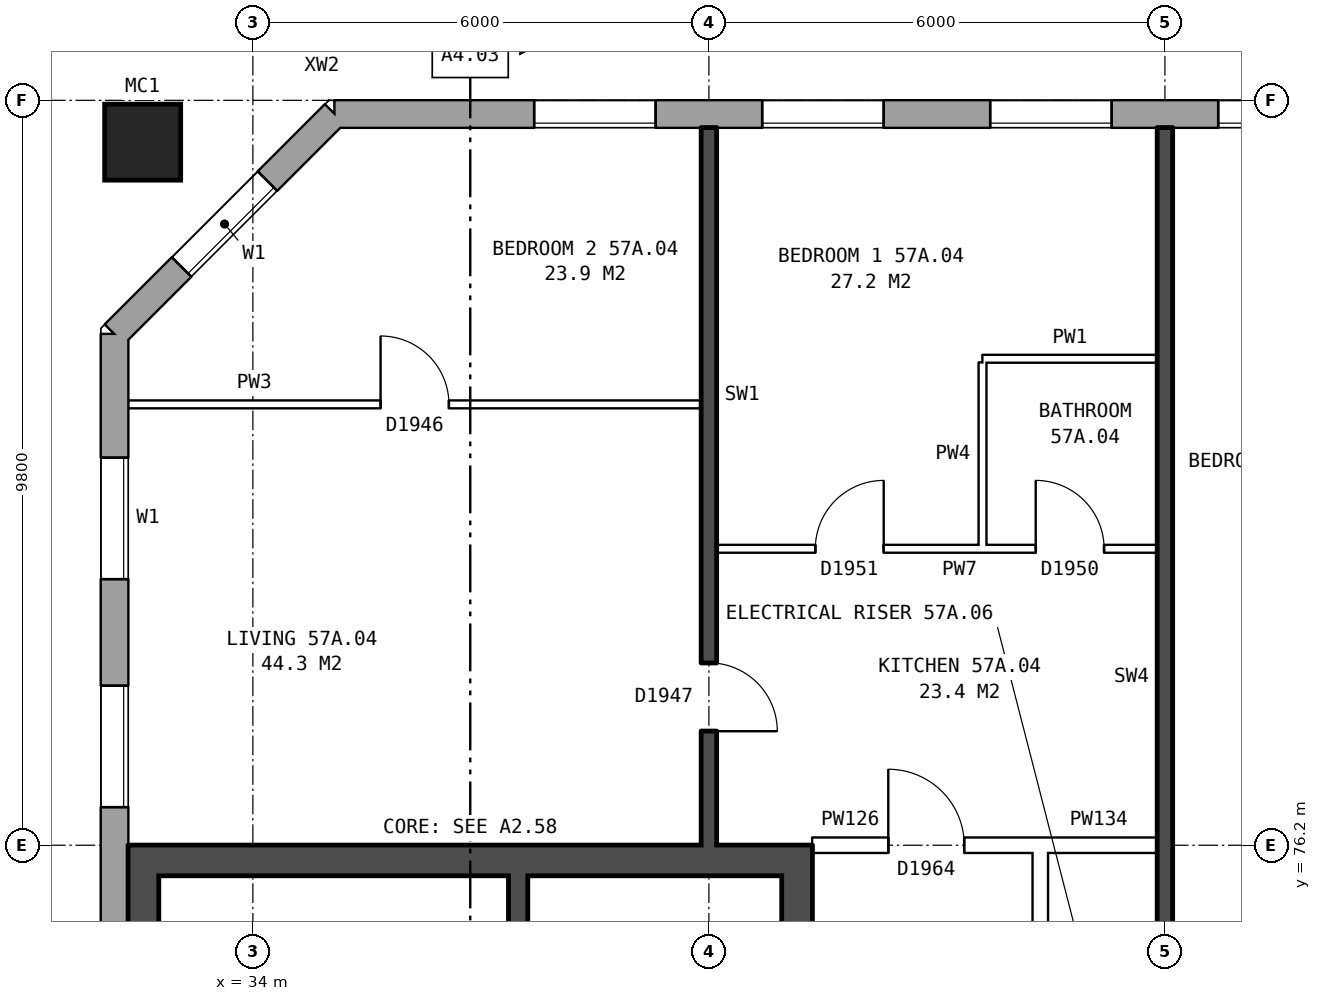
"""IFC4 building model, lengths in metres.
Left out: names, types, materials, properties, quantities, classifications, styles, units other than length and angle.
Written with IfcOpenShell. Run it as: python <this file> out.ifc"""

import sys

from ifc_helpers import new_model, si_unit, direction, frame, frame_2d, origin, origin_2d, place, context, subcontext, project, spatial, rectangle, hollow_rectangle, extrude, element, fill, save


model = new_model("IFC4")
c1 = context("Model", 3, precision=1e-05, world=origin(), true_north=direction((0.0, 1.0)))
c2 = subcontext(c1, "Body", "Model", "MODEL_VIEW")
j1 = project(units=[si_unit("LENGTHUNIT", "METRE"), si_unit("PLANEANGLEUNIT", "RADIAN")], contexts=[c1])
p1 = place(None, origin())
s1 = spatial("IfcSite", under=j1, at=p1, CompositionType="ELEMENT")
p2 = place(p1, origin())
s2 = spatial("IfcBuilding", under=s1, at=p2, CompositionType="ELEMENT")
p3 = place(p2, frame((0.0, 0.0, 202.8)))
s3 = spatial("IfcBuildingStorey", under=s2, at=p3, CompositionType="ELEMENT", Elevation=202.8)
p4 = place(p3, frame((32.55, 85.45, 0.0), z_axis=(0.0, 0.0, 1.0), x_axis=(1.0, 0.0, 0.0)))
e1 = element("IfcColumn", 1, at=p4, inside=s3, PredefinedType="COLUMN", context=c2, shape_type="SweptSolid", body=[
    extrude(hollow_rectangle(XDim=1.0, YDim=1.0, WallThickness=0.055, at=origin_2d()), origin(), (0.0, 0.0, 1.0), 3.1),
])
p5 = place(p3, frame((74.95, 85.82, 0.0), z_axis=(0.0, 0.0, 1.0), x_axis=(-1.0, 0.0, 0.0)))
e2 = element("IfcWall", 2, at=p5, inside=s3, PredefinedType="STANDARD", context=c2, shape_type="SweptSolid", body=[
    extrude(rectangle(XDim=39.875, YDim=0.36, at=frame_2d((19.938, 0.0))), origin(), (0.0, 0.0, 1.0), 2.85),
])
p6 = place(p5, frame((2.65, 0.0, 0.8)))
e3 = element("IfcOpeningElement", 3, at=p6, cuts=e2, PredefinedType="OPENING", context=c2, shape_type="SweptSolid", body=[
    extrude(rectangle(XDim=1.6, YDim=1.8, at=frame_2d((0.8, 0.9))), frame((0.0, 0.19, 0.0), z_axis=(0.0, -1.0, 0.0), x_axis=(1.0, 0.0, 0.0)), (0.0, 0.0, 1.0), 0.38),
])
p7 = place(p5, frame((5.65, 0.0, 0.8)))
e4 = element("IfcOpeningElement", 4, at=p7, cuts=e2, PredefinedType="OPENING", context=c2, shape_type="SweptSolid", body=[
    extrude(rectangle(XDim=1.6, YDim=1.8, at=frame_2d((0.8, 0.9))), frame((0.0, 0.19, 0.0), z_axis=(0.0, -1.0, 0.0), x_axis=(1.0, 0.0, 0.0)), (0.0, 0.0, 1.0), 0.38),
])
p8 = place(p5, frame((8.65, 0.0, 0.8)))
e5 = element("IfcOpeningElement", 5, at=p8, cuts=e2, PredefinedType="OPENING", context=c2, shape_type="SweptSolid", body=[
    extrude(rectangle(XDim=1.6, YDim=1.8, at=frame_2d((0.8, 0.9))), frame((0.0, 0.19, 0.0), z_axis=(0.0, -1.0, 0.0), x_axis=(1.0, 0.0, 0.0)), (0.0, 0.0, 1.0), 0.38),
])
p9 = place(p5, frame((11.65, 0.0, 0.8)))
e6 = element("IfcOpeningElement", 6, at=p9, cuts=e2, PredefinedType="OPENING", context=c2, shape_type="SweptSolid", body=[
    extrude(rectangle(XDim=1.6, YDim=1.8, at=frame_2d((0.8, 0.9))), frame((0.0, 0.19, 0.0), z_axis=(0.0, -1.0, 0.0), x_axis=(1.0, 0.0, 0.0)), (0.0, 0.0, 1.0), 0.38),
])
p10 = place(p5, frame((14.65, 0.0, 0.8)))
e7 = element("IfcOpeningElement", 7, at=p10, cuts=e2, PredefinedType="OPENING", context=c2, shape_type="SweptSolid", body=[
    extrude(rectangle(XDim=1.6, YDim=1.8, at=frame_2d((0.8, 0.9))), frame((0.0, 0.19, 0.0), z_axis=(0.0, -1.0, 0.0), x_axis=(1.0, 0.0, 0.0)), (0.0, 0.0, 1.0), 0.38),
])
p11 = place(p5, frame((17.65, 0.0, 0.8)))
e8 = element("IfcOpeningElement", 8, at=p11, cuts=e2, PredefinedType="OPENING", context=c2, shape_type="SweptSolid", body=[
    extrude(rectangle(XDim=1.6, YDim=1.8, at=frame_2d((0.8, 0.9))), frame((0.0, 0.19, 0.0), z_axis=(0.0, -1.0, 0.0), x_axis=(1.0, 0.0, 0.0)), (0.0, 0.0, 1.0), 0.38),
])
p12 = place(p5, frame((20.65, 0.0, 0.8)))
e9 = element("IfcOpeningElement", 9, at=p12, cuts=e2, PredefinedType="OPENING", context=c2, shape_type="SweptSolid", body=[
    extrude(rectangle(XDim=1.6, YDim=1.8, at=frame_2d((0.8, 0.9))), frame((0.0, 0.19, 0.0), z_axis=(0.0, -1.0, 0.0), x_axis=(1.0, 0.0, 0.0)), (0.0, 0.0, 1.0), 0.38),
])
p13 = place(p5, frame((23.65, 0.0, 0.8)))
e10 = element("IfcOpeningElement", 10, at=p13, cuts=e2, PredefinedType="OPENING", context=c2, shape_type="SweptSolid", body=[
    extrude(rectangle(XDim=1.6, YDim=1.8, at=frame_2d((0.8, 0.9))), frame((0.0, 0.19, 0.0), z_axis=(0.0, -1.0, 0.0), x_axis=(1.0, 0.0, 0.0)), (0.0, 0.0, 1.0), 0.38),
])
p14 = place(p5, frame((26.65, 0.0, 0.8)))
e11 = element("IfcOpeningElement", 11, at=p14, cuts=e2, PredefinedType="OPENING", context=c2, shape_type="SweptSolid", body=[
    extrude(rectangle(XDim=1.6, YDim=1.8, at=frame_2d((0.8, 0.9))), frame((0.0, 0.19, 0.0), z_axis=(0.0, -1.0, 0.0), x_axis=(1.0, 0.0, 0.0)), (0.0, 0.0, 1.0), 0.38),
])
p15 = place(p5, frame((29.65, 0.0, 0.8)))
e12 = element("IfcOpeningElement", 12, at=p15, cuts=e2, PredefinedType="OPENING", context=c2, shape_type="SweptSolid", body=[
    extrude(rectangle(XDim=1.6, YDim=1.8, at=frame_2d((0.8, 0.9))), frame((0.0, 0.19, 0.0), z_axis=(0.0, -1.0, 0.0), x_axis=(1.0, 0.0, 0.0)), (0.0, 0.0, 1.0), 0.38),
])
p16 = place(p5, frame((32.65, 0.0, 0.8)))
e13 = element("IfcOpeningElement", 13, at=p16, cuts=e2, PredefinedType="OPENING", context=c2, shape_type="SweptSolid", body=[
    extrude(rectangle(XDim=1.6, YDim=1.8, at=frame_2d((0.8, 0.9))), frame((0.0, 0.19, 0.0), z_axis=(0.0, -1.0, 0.0), x_axis=(1.0, 0.0, 0.0)), (0.0, 0.0, 1.0), 0.38),
])
p17 = place(p5, frame((35.65, 0.0, 0.8)))
e14 = element("IfcOpeningElement", 14, at=p17, cuts=e2, PredefinedType="OPENING", context=c2, shape_type="SweptSolid", body=[
    extrude(rectangle(XDim=1.6, YDim=1.8, at=frame_2d((0.8, 0.9))), frame((0.0, 0.19, 0.0), z_axis=(0.0, -1.0, 0.0), x_axis=(1.0, 0.0, 0.0)), (0.0, 0.0, 1.0), 0.38),
])
p18 = place(p3, frame((35.075, 85.82, 0.0), z_axis=(0.0, 0.0, 1.0), x_axis=(-0.707106781187, -0.707106781187, 0.0)))
e15 = element("IfcWall", 15, at=p18, inside=s3, PredefinedType="STANDARD", context=c2, shape_type="SweptSolid", body=[
    extrude(rectangle(XDim=4.094, YDim=0.36, at=frame_2d((2.047, 0.0))), origin(), (0.0, 0.0, 1.0), 2.85),
])
p19 = place(p18, frame((1.247, 0.0, 0.8)))
e16 = element("IfcOpeningElement", 16, at=p19, cuts=e15, PredefinedType="OPENING", context=c2, shape_type="SweptSolid", body=[
    extrude(rectangle(XDim=1.6, YDim=1.8, at=frame_2d((0.8, 0.9))), frame((0.0, 0.19, 0.0), z_axis=(0.0, -1.0, 0.0), x_axis=(1.0, 0.0, 0.0)), (0.0, 0.0, 1.0), 0.38),
])
p20 = place(p3, frame((32.18, 82.925, 0.0), z_axis=(0.0, 0.0, 1.0), x_axis=(0.0, -1.0, 0.0)))
e17 = element("IfcWall", 17, at=p20, inside=s3, PredefinedType="STANDARD", context=c2, shape_type="SweptSolid", body=[
    extrude(rectangle(XDim=25.851, YDim=0.36, at=frame_2d((12.925, 0.0))), origin(), (0.0, 0.0, 1.0), 2.85),
])
p21 = place(p20, frame((1.625, 0.0, 0.8)))
e18 = element("IfcOpeningElement", 18, at=p21, cuts=e17, PredefinedType="OPENING", context=c2, shape_type="SweptSolid", body=[
    extrude(rectangle(XDim=1.6, YDim=1.8, at=frame_2d((0.8, 0.9))), frame((0.0, 0.19, 0.0), z_axis=(0.0, -1.0, 0.0), x_axis=(1.0, 0.0, 0.0)), (0.0, 0.0, 1.0), 0.38),
])
p22 = place(p20, frame((4.625, 0.0, 0.8)))
e19 = element("IfcOpeningElement", 19, at=p22, cuts=e17, PredefinedType="OPENING", context=c2, shape_type="SweptSolid", body=[
    extrude(rectangle(XDim=1.6, YDim=1.8, at=frame_2d((0.8, 0.9))), frame((0.0, 0.19, 0.0), z_axis=(0.0, -1.0, 0.0), x_axis=(1.0, 0.0, 0.0)), (0.0, 0.0, 1.0), 0.38),
])
p23 = place(p20, frame((19.625, 0.0, 0.8)))
e20 = element("IfcOpeningElement", 20, at=p23, cuts=e17, PredefinedType="OPENING", context=c2, shape_type="SweptSolid", body=[
    extrude(rectangle(XDim=1.6, YDim=1.8, at=frame_2d((0.8, 0.9))), frame((0.0, 0.19, 0.0), z_axis=(0.0, -1.0, 0.0), x_axis=(1.0, 0.0, 0.0)), (0.0, 0.0, 1.0), 0.38),
])
p24 = place(p20, frame((22.625, 0.0, 0.8)))
e21 = element("IfcOpeningElement", 21, at=p24, cuts=e17, PredefinedType="OPENING", context=c2, shape_type="SweptSolid", body=[
    extrude(rectangle(XDim=1.6, YDim=1.8, at=frame_2d((0.8, 0.9))), frame((0.0, 0.19, 0.0), z_axis=(0.0, -1.0, 0.0), x_axis=(1.0, 0.0, 0.0)), (0.0, 0.0, 1.0), 0.38),
])
p25 = place(p3, frame((41.16, 76.2, 0.0), z_axis=(0.0, 0.0, 1.0), x_axis=(0.0, -1.0, 0.0)))
e22 = element("IfcWall", 22, at=p25, inside=s3, PredefinedType="SHEAR", context=c2, shape_type="SweptSolid", body=[
    extrude(rectangle(XDim=12.4, YDim=0.4, at=frame_2d((6.2, 0.0))), origin(), (0.0, 0.0, 1.0), 2.85),
])
p26 = place(p25, frame((1.325, 0.0, 0.0)))
e23 = element("IfcOpeningElement", 23, at=p26, cuts=e22, PredefinedType="OPENING", context=c2, shape_type="SweptSolid", body=[
    extrude(rectangle(XDim=1.1, YDim=2.1, at=frame_2d((0.55, 1.05))), frame((0.0, 0.21, 0.0), z_axis=(0.0, -1.0, 0.0), x_axis=(1.0, 0.0, 0.0)), (0.0, 0.0, 1.0), 0.42),
])
p27 = place(p25, frame((4.225, 0.0, 0.0)))
e24 = element("IfcOpeningElement", 24, at=p27, cuts=e22, PredefinedType="OPENING", context=c2, shape_type="SweptSolid", body=[
    extrude(rectangle(XDim=0.85, YDim=2.1, at=frame_2d((0.425, 1.05))), frame((0.0, 0.21, 0.0), z_axis=(0.0, -1.0, 0.0), x_axis=(1.0, 0.0, 0.0)), (0.0, 0.0, 1.0), 0.42),
])
p28 = place(p25, frame((7.475, 0.0, 0.0)))
e25 = element("IfcOpeningElement", 25, at=p28, cuts=e22, PredefinedType="OPENING", context=c2, shape_type="SweptSolid", body=[
    extrude(rectangle(XDim=0.85, YDim=2.1, at=frame_2d((0.425, 1.05))), frame((0.0, 0.21, 0.0), z_axis=(0.0, -1.0, 0.0), x_axis=(1.0, 0.0, 0.0)), (0.0, 0.0, 1.0), 0.42),
])
p29 = place(p25, frame((9.9, 0.0, 0.0)))
e26 = element("IfcOpeningElement", 26, at=p29, cuts=e22, PredefinedType="OPENING", context=c2, shape_type="SweptSolid", body=[
    extrude(rectangle(XDim=1.1, YDim=2.1, at=frame_2d((0.55, 1.05))), frame((0.0, 0.21, 0.0), z_axis=(0.0, -1.0, 0.0), x_axis=(1.0, 0.0, 0.0)), (0.0, 0.0, 1.0), 0.42),
])
p30 = place(p3, frame((32.56, 76.2, 0.0), z_axis=(0.0, 0.0, 1.0), x_axis=(0.0, -1.0, 0.0)))
e27 = element("IfcWall", 27, at=p30, inside=s3, PredefinedType="SHEAR", context=c2, shape_type="SweptSolid", body=[
    extrude(rectangle(XDim=12.4, YDim=0.4, at=frame_2d((6.2, 0.0))), origin(), (0.0, 0.0, 1.0), 2.85),
])
p31 = place(p3, frame((40.96, 76.0, 0.0), z_axis=(0.0, 0.0, 1.0), x_axis=(-1.0, 0.0, 0.0)))
e28 = element("IfcWall", 28, at=p31, inside=s3, PredefinedType="SHEAR", context=c2, shape_type="SweptSolid", body=[
    extrude(rectangle(XDim=8.2, YDim=0.4, at=frame_2d((4.1, 0.0))), origin(), (0.0, 0.0, 1.0), 2.85),
])
p32 = place(p3, frame((37.49, 75.8, 0.0), z_axis=(0.0, 0.0, 1.0), x_axis=(0.0, -1.0, 0.0)))
e29 = element("IfcWall", 29, at=p32, inside=s3, PredefinedType="SHEAR", context=c2, shape_type="SweptSolid", body=[
    extrude(rectangle(XDim=2.525, YDim=0.25, at=frame_2d((1.263, 0.0))), origin(), (0.0, 0.0, 1.0), 2.85),
])
p33 = place(p3, frame((44.36, 63.9, 0.0), z_axis=(0.0, 0.0, 1.0), x_axis=(0.0, 1.0, 0.0)))
e30 = element("IfcWall", 30, at=p33, inside=s3, PredefinedType="PARTITIONING", context=c2, shape_type="SweptSolid", body=[
    extrude(rectangle(XDim=12.2, YDim=0.2, at=frame_2d((6.1, 0.0))), origin(), (0.0, 0.0, 1.0), 2.85),
])
p34 = place(p33, frame((5.1, 0.0, 0.0)))
e31 = element("IfcOpeningElement", 31, at=p34, cuts=e30, PredefinedType="OPENING", context=c2, shape_type="SweptSolid", body=[
    extrude(rectangle(XDim=2.0, YDim=2.1, at=frame_2d((1.0, 1.05))), frame((0.0, 0.11, 0.0), z_axis=(0.0, -1.0, 0.0), x_axis=(1.0, 0.0, 0.0)), (0.0, 0.0, 1.0), 0.22),
])
p35 = place(p3, frame((41.36, 76.2, 0.0), z_axis=(0.0, 0.0, 1.0), x_axis=(1.0, 0.0, 0.0)))
e32 = element("IfcWall", 32, at=p35, inside=s3, PredefinedType="PARTITIONING", context=c2, shape_type="SweptSolid", body=[
    extrude(rectangle(XDim=3.0, YDim=0.2, at=frame_2d((1.5, 0.0))), origin(), (0.0, 0.0, 1.0), 2.85),
])
p36 = place(p35, frame((1.0, 0.0, 0.0)))
e33 = element("IfcOpeningElement", 33, at=p36, cuts=e32, PredefinedType="OPENING", context=c2, shape_type="SweptSolid", body=[
    extrude(rectangle(XDim=1.0, YDim=2.1, at=frame_2d((0.5, 1.05))), frame((0.0, 0.11, 0.0), z_axis=(0.0, -1.0, 0.0), x_axis=(1.0, 0.0, 0.0)), (0.0, 0.0, 1.0), 0.22),
])
p37 = place(p3, frame((44.36, 76.2, 0.0), z_axis=(0.0, 0.0, 1.0), x_axis=(1.0, 0.0, 0.0)))
e34 = element("IfcWall", 34, at=p37, inside=s3, PredefinedType="PARTITIONING", context=c2, shape_type="SweptSolid", body=[
    extrude(rectangle(XDim=1.54, YDim=0.2, at=frame_2d((0.77, 0.0))), origin(), (0.0, 0.0, 1.0), 2.85),
])
p38 = place(p3, frame((40.1, 80.1, 0.0), z_axis=(0.0, 0.0, 1.0), x_axis=(1.0, 0.0, 0.0)))
e35 = element("IfcWall", 35, at=p38, inside=s3, PredefinedType="PARTITIONING", context=c2, shape_type="SweptSolid", body=[
    extrude(rectangle(XDim=5.8, YDim=0.1, at=frame_2d((2.9, 0.0))), origin(), (0.0, 0.0, 1.0), 2.85),
])
p39 = place(p38, frame((1.3, 0.0, 0.0)))
e36 = element("IfcOpeningElement", 36, at=p39, cuts=e35, PredefinedType="OPENING", context=c2, shape_type="SweptSolid", body=[
    extrude(rectangle(XDim=0.9, YDim=2.1, at=frame_2d((0.45, 1.05))), frame((0.0, 0.06, 0.0), z_axis=(0.0, -1.0, 0.0), x_axis=(1.0, 0.0, 0.0)), (0.0, 0.0, 1.0), 0.12),
])
p40 = place(p38, frame((4.2, 0.0, 0.0)))
e37 = element("IfcOpeningElement", 37, at=p40, cuts=e35, PredefinedType="OPENING", context=c2, shape_type="SweptSolid", body=[
    extrude(rectangle(XDim=0.9, YDim=2.1, at=frame_2d((0.45, 1.05))), frame((0.0, 0.06, 0.0), z_axis=(0.0, -1.0, 0.0), x_axis=(1.0, 0.0, 0.0)), (0.0, 0.0, 1.0), 0.12),
])
p41 = place(p3, frame((32.36, 82.0, 0.0), z_axis=(0.0, 0.0, 1.0), x_axis=(1.0, 0.0, 0.0)))
e38 = element("IfcWall", 38, at=p41, inside=s3, PredefinedType="PARTITIONING", context=c2, shape_type="SweptSolid", body=[
    extrude(rectangle(XDim=7.54, YDim=0.1, at=frame_2d((3.77, 0.0))), origin(), (0.0, 0.0, 1.0), 2.85),
])
p42 = place(p41, frame((3.32, 0.0, 0.0)))
e39 = element("IfcOpeningElement", 39, at=p42, cuts=e38, PredefinedType="OPENING", context=c2, shape_type="SweptSolid", body=[
    extrude(rectangle(XDim=0.9, YDim=2.1, at=frame_2d((0.45, 1.05))), frame((0.0, 0.06, 0.0), z_axis=(0.0, -1.0, 0.0), x_axis=(1.0, 0.0, 0.0)), (0.0, 0.0, 1.0), 0.12),
])
p43 = place(p3, frame((43.6, 82.6, 0.0), z_axis=(0.0, 0.0, 1.0), x_axis=(1.0, 0.0, 0.0)))
e40 = element("IfcWall", 40, at=p43, inside=s3, PredefinedType="PARTITIONING", context=c2, shape_type="SweptSolid", body=[
    extrude(rectangle(XDim=2.3, YDim=0.1, at=frame_2d((1.15, 0.0))), origin(), (0.0, 0.0, 1.0), 2.85),
])
p44 = place(p3, frame((40.0, 76.2, 0.0), z_axis=(0.0, 0.0, 1.0), x_axis=(0.0, 1.0, 0.0)))
e41 = element("IfcWall", 41, at=p44, inside=s3, PredefinedType="SOLIDWALL", context=c2, shape_type="SweptSolid", body=[
    extrude(rectangle(XDim=9.44, YDim=0.2, at=frame_2d((4.72, 0.0))), origin(), (0.0, 0.0, 1.0), 2.85),
])
p45 = place(p44, frame((1.5, 0.0, 0.0)))
e42 = element("IfcOpeningElement", 42, at=p45, cuts=e41, PredefinedType="OPENING", context=c2, shape_type="SweptSolid", body=[
    extrude(rectangle(XDim=0.9, YDim=2.1, at=frame_2d((0.45, 1.05))), frame((0.0, 0.11, 0.0), z_axis=(0.0, -1.0, 0.0), x_axis=(1.0, 0.0, 0.0)), (0.0, 0.0, 1.0), 0.22),
])
p46 = place(p3, frame((43.6, 80.15, 0.0), z_axis=(0.0, 0.0, 1.0), x_axis=(0.0, 1.0, 0.0)))
e43 = element("IfcWall", 43, at=p46, inside=s3, PredefinedType="PARTITIONING", context=c2, shape_type="SweptSolid", body=[
    extrude(rectangle(XDim=2.4, YDim=0.1, at=frame_2d((1.2, 0.0))), origin(), (0.0, 0.0, 1.0), 2.85),
])
p47 = place(p3, frame((46.0, 71.2, 0.0), z_axis=(0.0, 0.0, 1.0), x_axis=(0.0, 1.0, 0.0)))
e44 = element("IfcWall", 44, at=p47, inside=s3, PredefinedType="SOLIDWALL", context=c2, shape_type="SweptSolid", body=[
    extrude(rectangle(XDim=14.44, YDim=0.2, at=frame_2d((7.22, 0.0))), origin(), (0.0, 0.0, 1.0), 2.85),
])
p48 = place(p14, origin())
e45 = element("IfcWindow", 45, at=p48, inside=s3, PartitioningType="SINGLE_PANEL", PredefinedType="WINDOW", context=c2, shape_type="SweptSolid", body=[
    extrude(rectangle(XDim=1.6, YDim=1.8, at=frame_2d((0.8, 0.9))), frame((0.0, 0.15, 0.0), z_axis=(0.0, -1.0, 0.0), x_axis=(1.0, 0.0, 0.0)), (0.0, 0.0, 1.0), 0.06),
])
fill(e11, e45)
p49 = place(p15, origin())
e46 = element("IfcWindow", 46, at=p49, inside=s3, PartitioningType="SINGLE_PANEL", PredefinedType="WINDOW", context=c2, shape_type="SweptSolid", body=[
    extrude(rectangle(XDim=1.6, YDim=1.8, at=frame_2d((0.8, 0.9))), frame((0.0, 0.15, 0.0), z_axis=(0.0, -1.0, 0.0), x_axis=(1.0, 0.0, 0.0)), (0.0, 0.0, 1.0), 0.06),
])
fill(e12, e46)
p50 = place(p16, origin())
e47 = element("IfcWindow", 47, at=p50, inside=s3, PartitioningType="SINGLE_PANEL", PredefinedType="WINDOW", context=c2, shape_type="SweptSolid", body=[
    extrude(rectangle(XDim=1.6, YDim=1.8, at=frame_2d((0.8, 0.9))), frame((0.0, 0.15, 0.0), z_axis=(0.0, -1.0, 0.0), x_axis=(1.0, 0.0, 0.0)), (0.0, 0.0, 1.0), 0.06),
])
fill(e13, e47)
p51 = place(p17, origin())
e48 = element("IfcWindow", 48, at=p51, inside=s3, PartitioningType="SINGLE_PANEL", PredefinedType="WINDOW", context=c2, shape_type="SweptSolid", body=[
    extrude(rectangle(XDim=1.6, YDim=1.8, at=frame_2d((0.8, 0.9))), frame((0.0, 0.15, 0.0), z_axis=(0.0, -1.0, 0.0), x_axis=(1.0, 0.0, 0.0)), (0.0, 0.0, 1.0), 0.06),
])
fill(e14, e48)
p52 = place(p19, origin())
e49 = element("IfcWindow", 49, at=p52, inside=s3, PartitioningType="SINGLE_PANEL", PredefinedType="WINDOW", context=c2, shape_type="SweptSolid", body=[
    extrude(rectangle(XDim=1.6, YDim=1.8, at=frame_2d((0.8, 0.9))), frame((0.0, 0.15, 0.0), z_axis=(0.0, -1.0, 0.0), x_axis=(1.0, 0.0, 0.0)), (0.0, 0.0, 1.0), 0.06),
])
fill(e16, e49)
p53 = place(p21, origin())
e50 = element("IfcWindow", 50, at=p53, inside=s3, PartitioningType="SINGLE_PANEL", PredefinedType="WINDOW", context=c2, shape_type="SweptSolid", body=[
    extrude(rectangle(XDim=1.6, YDim=1.8, at=frame_2d((0.8, 0.9))), frame((0.0, 0.15, 0.0), z_axis=(0.0, -1.0, 0.0), x_axis=(1.0, 0.0, 0.0)), (0.0, 0.0, 1.0), 0.06),
])
fill(e18, e50)
p54 = place(p22, origin())
e51 = element("IfcWindow", 51, at=p54, inside=s3, PartitioningType="SINGLE_PANEL", PredefinedType="WINDOW", context=c2, shape_type="SweptSolid", body=[
    extrude(rectangle(XDim=1.6, YDim=1.8, at=frame_2d((0.8, 0.9))), frame((0.0, 0.15, 0.0), z_axis=(0.0, -1.0, 0.0), x_axis=(1.0, 0.0, 0.0)), (0.0, 0.0, 1.0), 0.06),
])
fill(e19, e51)
p55 = place(p39, origin())
e52 = element("IfcDoor", 52, at=p55, inside=s3, OperationType="SINGLE_SWING_RIGHT", PredefinedType="DOOR", context=c2, shape_type="SweptSolid", body=[
    extrude(rectangle(XDim=0.9, YDim=2.1, at=frame_2d((0.45, 1.05))), frame((0.0, 0.025, 0.0), z_axis=(0.0, -1.0, 0.0), x_axis=(1.0, 0.0, 0.0)), (0.0, 0.0, 1.0), 0.05),
])
fill(e36, e52)
p56 = place(p42, origin())
e53 = element("IfcDoor", 53, at=p56, inside=s3, OperationType="SINGLE_SWING_LEFT", PredefinedType="DOOR", context=c2, shape_type="SweptSolid", body=[
    extrude(rectangle(XDim=0.9, YDim=2.1, at=frame_2d((0.45, 1.05))), frame((0.0, 0.025, 0.0), z_axis=(0.0, -1.0, 0.0), x_axis=(1.0, 0.0, 0.0)), (0.0, 0.0, 1.0), 0.05),
])
fill(e39, e53)
p57 = place(p36, origin())
e54 = element("IfcDoor", 54, at=p57, inside=s3, OperationType="SINGLE_SWING_LEFT", PredefinedType="DOOR", context=c2, shape_type="SweptSolid", body=[
    extrude(rectangle(XDim=1.0, YDim=2.1, at=frame_2d((0.5, 1.05))), frame((0.0, 0.025, 0.0), z_axis=(0.0, -1.0, 0.0), x_axis=(1.0, 0.0, 0.0)), (0.0, 0.0, 1.0), 0.05),
])
fill(e33, e54)
p58 = place(p45, frame((0.9, 0.0, 0.0), z_axis=(0.0, 0.0, 1.0), x_axis=(-1.0, 0.0, 0.0)))
e55 = element("IfcDoor", 55, at=p58, inside=s3, OperationType="SINGLE_SWING_RIGHT", PredefinedType="DOOR", context=c2, shape_type="SweptSolid", body=[
    extrude(rectangle(XDim=0.9, YDim=2.1, at=frame_2d((0.45, 1.05))), frame((0.0, 0.025, 0.0), z_axis=(0.0, -1.0, 0.0), x_axis=(1.0, 0.0, 0.0)), (0.0, 0.0, 1.0), 0.05),
])
fill(e42, e55)
p59 = place(p40, origin())
e56 = element("IfcDoor", 56, at=p59, inside=s3, OperationType="SINGLE_SWING_LEFT", PredefinedType="DOOR", context=c2, shape_type="SweptSolid", body=[
    extrude(rectangle(XDim=0.9, YDim=2.1, at=frame_2d((0.45, 1.05))), frame((0.0, 0.025, 0.0), z_axis=(0.0, -1.0, 0.0), x_axis=(1.0, 0.0, 0.0)), (0.0, 0.0, 1.0), 0.05),
])
fill(e37, e56)
save(model, sys.argv[1])
